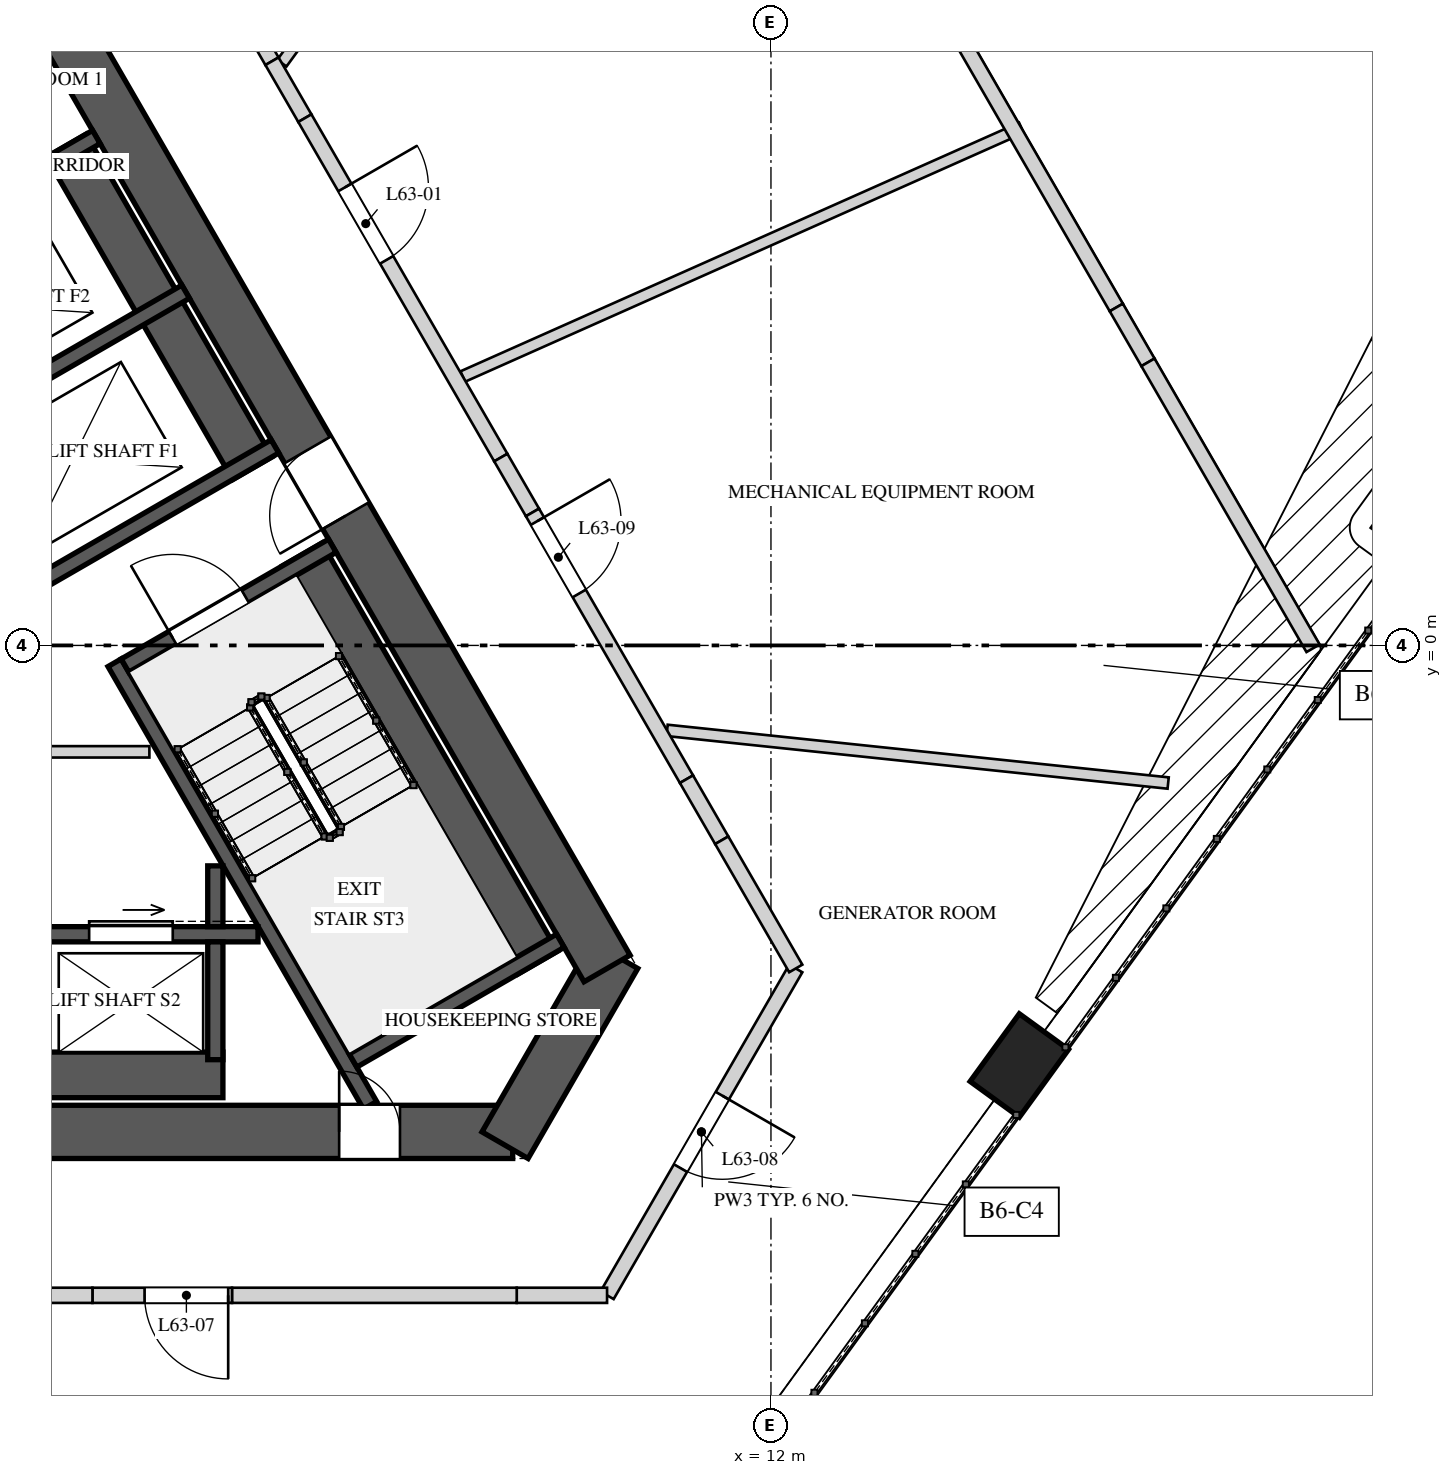
"""IFC4 building model, lengths in metres.
Left out: names, types, materials, properties, quantities, classifications, styles, units other than length and angle.
Written with IfcOpenShell. Run it as: python <this file> out.ifc"""

import sys

from ifc_helpers import new_model, si_unit, direction, frame, frame_2d, origin, origin_2d, place, context, subcontext, project, spatial, polyline, rectangle, outline, extrude, element, fill, save


model = new_model("IFC4")
c1 = context("Model", 3, precision=1e-05, world=origin(), true_north=direction((0.0, 1.0)))
c2 = subcontext(c1, "Body", "Model", "MODEL_VIEW")
j1 = project(units=[si_unit("LENGTHUNIT", "METRE"), si_unit("PLANEANGLEUNIT", "RADIAN")], contexts=[c1])
p1 = place(None, origin())
s1 = spatial("IfcSite", under=j1, at=p1, CompositionType="ELEMENT")
p2 = place(p1, origin())
s2 = spatial("IfcBuilding", under=s1, at=p2, CompositionType="ELEMENT")
p3 = place(p2, frame((0.0, 0.0, 269.2)))
s3 = spatial("IfcBuildingStorey", under=s2, at=p3, CompositionType="ELEMENT", Elevation=269.2)
p4 = place(p3, frame((-8.603, -6.4, 0.0), z_axis=(0.0, 0.0, 1.0), x_axis=(1.0, 0.0, 0.0)))
e1 = element("IfcWall", 1, at=p4, inside=s3, PredefinedType="SHEAR", context=c2, shape_type="SweptSolid", body=[
    extrude(rectangle(XDim=17.205, YDim=0.7, at=frame_2d((8.603, 0.0))), origin(), (0.0, 0.0, 1.0), 5.2),
])
p5 = place(p4, frame((6.808, 0.0, 0.0)))
e2 = element("IfcOpeningElement", 2, at=p5, cuts=e1, PredefinedType="OPENING", context=c2, shape_type="SweptSolid", body=[
    extrude(rectangle(XDim=1.0, YDim=2.4, at=frame_2d((0.5, 1.2))), frame((0.0, 0.36, 0.0), z_axis=(0.0, -1.0, 0.0), x_axis=(1.0, 0.0, 0.0)), (0.0, 0.0, 1.0), 0.72),
])
p6 = place(p4, frame((14.922, 0.0, 0.0)))
e3 = element("IfcOpeningElement", 3, at=p6, cuts=e1, PredefinedType="OPENING", context=c2, shape_type="SweptSolid", body=[
    extrude(rectangle(XDim=0.8, YDim=2.1, at=frame_2d((0.4, 1.05))), frame((0.0, 0.36, 0.0), z_axis=(0.0, -1.0, 0.0), x_axis=(1.0, 0.0, 0.0)), (0.0, 0.0, 1.0), 0.72),
])
p7 = place(p3, frame((8.501, -6.575, 0.0), z_axis=(0.0, 0.0, 1.0), x_axis=(0.499995765644, 0.866027848477, 0.0)))
e4 = element("IfcWall", 4, at=p7, inside=s3, PredefinedType="SHEAR", context=c2, shape_type="SweptSolid", body=[
    extrude(rectangle(XDim=2.887, YDim=0.7, at=frame_2d((1.443, 0.0))), origin(), (0.0, 0.0, 1.0), 5.2),
])
p8 = place(p3, frame((9.844, -4.25, 0.0), z_axis=(0.0, 0.0, 1.0), x_axis=(-0.500003331888, 0.866023480109, 0.0)))
e5 = element("IfcWall", 5, at=p8, inside=s3, PredefinedType="SHEAR", context=c2, shape_type="SweptSolid", body=[
    extrude(rectangle(XDim=17.205, YDim=0.7, at=frame_2d((8.603, 0.0))), origin(), (0.0, 0.0, 1.0), 5.2),
])
p9 = place(p8, frame((6.877, 0.0, 0.0)))
e6 = element("IfcOpeningElement", 6, at=p9, cuts=e5, PredefinedType="OPENING", context=c2, shape_type="SweptSolid", body=[
    extrude(rectangle(XDim=1.0, YDim=2.4, at=frame_2d((0.5, 1.2))), frame((0.0, 0.36, 0.0), z_axis=(0.0, -1.0, 0.0), x_axis=(1.0, 0.0, 0.0)), (0.0, 0.0, 1.0), 0.72),
])
p10 = place(p8, frame((14.445, 0.0, 0.0)))
e7 = element("IfcOpeningElement", 7, at=p10, cuts=e5, PredefinedType="OPENING", context=c2, shape_type="SweptSolid", body=[
    extrude(rectangle(XDim=0.8, YDim=2.1, at=frame_2d((0.4, 1.05))), frame((0.0, 0.36, 0.0), z_axis=(0.0, -1.0, 0.0), x_axis=(1.0, 0.0, 0.0)), (0.0, 0.0, 1.0), 0.72),
])
for number, where, z_axis, x_axis in (
    (8, (15.268, -5.526, 0.0), (0.0, 0.0, 1.0), (0.588, 0.809, 0.0)),
    (9, (20.562, 1.76, 0.0), (0.0, 0.0, 1.0), (0.588, 0.809, 0.0)),
):
    element("IfcColumn", number, at=place(p3, frame(where, z_axis=z_axis, x_axis=x_axis)), inside=s3, PredefinedType="COLUMN", context=c2, shape_type="SweptSolid", body=[
        extrude(rectangle(XDim=1.1, YDim=0.8, at=origin_2d()), origin(), (0.0, 0.0, 1.0), 2.787),
    ])
p11 = place(p3, frame((8.933, -4.172, 0.0), z_axis=(0.0, 0.0, 1.0), x_axis=(-0.500026960575, 0.86600983753, 0.0)))
e10 = element("IfcWall", 10, at=p11, inside=s3, PredefinedType="SOLIDWALL", context=c2, shape_type="SweptSolid", body=[
    extrude(rectangle(XDim=6.2, YDim=0.6, at=frame_2d((3.1, 0.0))), origin(), (0.0, 0.0, 1.0), 4.85),
])
p12 = place(p3, frame((6.726, -6.05, 0.0), z_axis=(0.0, 0.0, 1.0), x_axis=(-0.499970804718, 0.866042259032, 0.0)))
e11 = element("IfcWall", 11, at=p12, inside=s3, PredefinedType="SOLIDWALL", context=c2, shape_type="SweptSolid", body=[
    extrude(rectangle(XDim=6.723, YDim=0.2, at=frame_2d((3.361, 0.0))), origin(), (0.0, 0.0, 1.0), 4.85),
])
p13 = place(p3, frame((6.501, -5.461, 0.0), z_axis=(0.0, 0.0, 1.0), x_axis=(0.866035871367, 0.499981869177, 0.0)))
e12 = element("IfcWall", 12, at=p13, inside=s3, PredefinedType="SOLIDWALL", context=c2, shape_type="SweptSolid", body=[
    extrude(rectangle(XDim=3.15, YDim=0.2, at=frame_2d((1.575, 0.0))), origin(), (0.0, 0.0, 1.0), 4.85),
])
p14 = place(p3, frame((3.501, -0.265, 0.0), z_axis=(0.0, 0.0, 1.0), x_axis=(0.866035871367, 0.499981869177, 0.0)))
e13 = element("IfcWall", 13, at=p14, inside=s3, PredefinedType="SOLIDWALL", context=c2, shape_type="SweptSolid", body=[
    extrude(rectangle(XDim=3.15, YDim=0.2, at=frame_2d((1.575, 0.0))), origin(), (0.0, 0.0, 1.0), 4.85),
])
p15 = place(p14, frame((0.725, 0.0, 0.0)))
e14 = element("IfcOpeningElement", 14, at=p15, cuts=e13, PredefinedType="OPENING", context=c2, shape_type="SweptSolid", body=[
    extrude(rectangle(XDim=1.1, YDim=2.4, at=frame_2d((0.55, 1.2))), frame((0.0, 0.11, 0.0), z_axis=(0.0, -1.0, 0.0), x_axis=(1.0, 0.0, 0.0)), (0.0, 0.0, 1.0), 0.22),
])
p16 = place(p3, frame((-0.71, -3.8, 0.0), z_axis=(0.0, 0.0, 1.0), x_axis=(1.0, 0.0, 0.0)))
e15 = element("IfcWall", 15, at=p16, inside=s3, PredefinedType="SOLIDWALL", context=c2, shape_type="SweptSolid", body=[
    extrude(rectangle(XDim=5.961, YDim=0.2, at=frame_2d((2.981, 0.0))), origin(), (0.0, 0.0, 1.0), 4.85),
])
p17 = place(p16, frame((1.09, 0.0, 0.0)))
e16 = element("IfcOpeningElement", 16, at=p17, cuts=e15, PredefinedType="OPENING", context=c2, shape_type="SweptSolid", body=[
    extrude(rectangle(XDim=1.1, YDim=2.1, at=frame_2d((0.55, 1.05))), frame((0.0, 0.11, 0.0), z_axis=(0.0, -1.0, 0.0), x_axis=(1.0, 0.0, 0.0)), (0.0, 0.0, 1.0), 0.22),
])
p18 = place(p16, frame((3.74, 0.0, 0.0)))
e17 = element("IfcOpeningElement", 17, at=p18, cuts=e15, PredefinedType="OPENING", context=c2, shape_type="SweptSolid", body=[
    extrude(rectangle(XDim=1.1, YDim=2.1, at=frame_2d((0.55, 1.05))), frame((0.0, 0.11, 0.0), z_axis=(0.0, -1.0, 0.0), x_axis=(1.0, 0.0, 0.0)), (0.0, 0.0, 1.0), 0.22),
])
p19 = place(p3, frame((-0.71, -5.65, 0.0), z_axis=(0.0, 0.0, 1.0), x_axis=(1.0, 0.0, 0.0)))
e18 = element("IfcWall", 18, at=p19, inside=s3, PredefinedType="SOLIDWALL", context=c2, shape_type="SweptSolid", body=[
    extrude(rectangle(XDim=5.5, YDim=0.6, at=frame_2d((2.75, 0.0))), origin(), (0.0, 0.0, 1.0), 4.85),
])
p20 = place(p3, frame((4.69, -3.9, 0.0), z_axis=(0.0, 0.0, 1.0), x_axis=(0.0, -1.0, 0.0)))
e19 = element("IfcWall", 19, at=p20, inside=s3, PredefinedType="SOLIDWALL", context=c2, shape_type="SweptSolid", body=[
    extrude(rectangle(XDim=1.55, YDim=0.2, at=frame_2d((0.775, 0.0))), origin(), (0.0, 0.0, 1.0), 4.85),
])
p21 = place(p3, frame((4.69, -2.9, 0.0), z_axis=(0.0, 0.0, 1.0), x_axis=(0.0, -1.0, 0.0)))
e20 = element("IfcWall", 20, at=p21, inside=s3, PredefinedType="SOLIDWALL", context=c2, shape_type="SweptSolid", body=[
    extrude(rectangle(XDim=0.8, YDim=0.2, at=frame_2d((0.4, 0.0))), origin(), (0.0, 0.0, 1.0), 4.85),
])
p22 = place(p3, frame((5.178, 2.331, 0.0), z_axis=(0.0, 0.0, 1.0), x_axis=(-0.49998122708, 0.866036242063, 0.0)))
e21 = element("IfcWall", 21, at=p22, inside=s3, PredefinedType="SOLIDWALL", context=c2, shape_type="SweptSolid", body=[
    extrude(rectangle(XDim=4.9, YDim=0.6, at=frame_2d((2.45, 0.0))), origin(), (0.0, 0.0, 1.0), 4.85),
])
p23 = place(p3, frame((2.227, 0.743, 0.0), z_axis=(0.0, 0.0, 1.0), x_axis=(0.866022959057, 0.500004234368, 0.0)))
e22 = element("IfcWall", 22, at=p23, inside=s3, PredefinedType="SOLIDWALL", context=c2, shape_type="SweptSolid", body=[
    extrude(rectangle(XDim=3.75, YDim=0.2, at=frame_2d((1.875, 0.0))), origin(), (0.0, 0.0, 1.0), 4.85),
])
p24 = place(p3, frame((1.052, 2.778, 0.0), z_axis=(0.0, 0.0, 1.0), x_axis=(0.866039234136, 0.499976044363, 0.0)))
e23 = element("IfcWall", 23, at=p24, inside=s3, PredefinedType="SOLIDWALL", context=c2, shape_type="SweptSolid", body=[
    extrude(rectangle(XDim=3.75, YDim=0.2, at=frame_2d((1.875, 0.0))), origin(), (0.0, 0.0, 1.0), 4.85),
])
p25 = place(p3, frame((-0.123, 4.813, 0.0), z_axis=(0.0, 0.0, 1.0), x_axis=(0.866022959057, 0.500004234368, 0.0)))
e24 = element("IfcWall", 24, at=p25, inside=s3, PredefinedType="SOLIDWALL", context=c2, shape_type="SweptSolid", body=[
    extrude(rectangle(XDim=3.75, YDim=0.2, at=frame_2d((1.875, 0.0))), origin(), (0.0, 0.0, 1.0), 4.85),
])
p26 = place(p3, frame((-4.053, -1.4, 0.0), z_axis=(0.0, 0.0, 1.0), x_axis=(1.0, 0.0, 0.0)))
e25 = element("IfcWall", 25, at=p26, inside=s3, PredefinedType="PARTITIONING", context=c2, shape_type="SweptSolid", body=[
    extrude(rectangle(XDim=7.876, YDim=0.15, at=frame_2d((3.938, 0.0))), origin(), (0.0, 0.0, 1.0), 4.85),
])
p27 = place(p3, frame((5.565, 7.66, 0.0), z_axis=(0.0, 0.0, 1.0), x_axis=(0.587787750024, 0.809015179661, 0.0)))
e26 = element("IfcWall", 26, at=p27, inside=s3, PredefinedType="PARTITIONING", context=c2, shape_type="SweptSolid", body=[
    extrude(rectangle(XDim=3.555, YDim=0.15, at=frame_2d((1.777, 0.0))), origin(), (0.0, 0.0, 1.0), 3.95),
])
p28 = place(p3, frame((10.634, -1.118, 0.0), z_axis=(0.0, 0.0, 1.0), x_axis=(0.994521586964, -0.104531397497, 0.0)))
e27 = element("IfcWall", 27, at=p28, inside=s3, PredefinedType="PARTITIONING", context=c2, shape_type="SweptSolid", body=[
    extrude(rectangle(XDim=6.628, YDim=0.15, at=frame_2d((3.314, 0.0))), origin(), (0.0, 0.0, 1.0), 4.85),
])
p29 = place(p3, frame((15.294, 6.81, 0.0), z_axis=(0.0, 0.0, 1.0), x_axis=(-0.91353850426, -0.406752260269, 0.0)))
e28 = element("IfcWall", 28, at=p29, inside=s3, PredefinedType="PARTITIONING", context=c2, shape_type="SweptSolid", body=[
    extrude(rectangle(XDim=8.044, YDim=0.15, at=frame_2d((4.022, 0.0))), origin(), (0.0, 0.0, 1.0), 4.85),
])
p30 = place(p3, frame((12.326, -4.25, 0.0), z_axis=(0.0, 0.0, 1.0), x_axis=(-0.50000478328, -0.866022642139, 0.0)))
e29 = element("IfcWall", 29, at=p30, inside=s3, PredefinedType="SOLIDWALL", context=c2, shape_type="SweptSolid", body=[
    extrude(rectangle(XDim=4.965, YDim=0.2, at=frame_2d((2.483, 0.0))), origin(), (0.0, 0.0, 1.0), 4.85),
])
p31 = place(p30, frame((1.933, 0.0, 0.0)))
e30 = element("IfcOpeningElement", 30, at=p31, cuts=e29, PredefinedType="OPENING", context=c2, shape_type="SweptSolid", body=[
    extrude(rectangle(XDim=1.1, YDim=2.2, at=frame_2d((0.55, 1.1))), frame((0.0, 0.11, 0.0), z_axis=(0.0, -1.0, 0.0), x_axis=(1.0, 0.0, 0.0)), (0.0, 0.0, 1.0), 0.22),
])
p32 = place(p3, frame((9.844, -8.55, 0.0), z_axis=(0.0, 0.0, 1.0), x_axis=(-1.0, 0.0, 0.0)))
e31 = element("IfcWall", 31, at=p32, inside=s3, PredefinedType="SOLIDWALL", context=c2, shape_type="SweptSolid", body=[
    extrude(rectangle(XDim=1.188, YDim=0.2, at=frame_2d((0.594, 0.0))), origin(), (0.0, 0.0, 1.0), 4.15),
])
p33 = place(p3, frame((8.655, -8.55, 0.0), z_axis=(0.0, 0.0, 1.0), x_axis=(-1.0, 0.0, 0.0)))
e32 = element("IfcWall", 32, at=p33, inside=s3, PredefinedType="SOLIDWALL", context=c2, shape_type="SweptSolid", body=[
    extrude(rectangle(XDim=3.746, YDim=0.2, at=frame_2d((1.873, 0.0))), origin(), (0.0, 0.0, 1.0), 4.85),
])
p34 = place(p3, frame((4.909, -8.55, 0.0), z_axis=(0.0, 0.0, 1.0), x_axis=(-1.0, 0.0, 0.0)))
e33 = element("IfcWall", 33, at=p34, inside=s3, PredefinedType="SOLIDWALL", context=c2, shape_type="SweptSolid", body=[
    extrude(outline(polyline([(0.0, 0.0), (1.836, 0.0), (1.836, 3.95), (0.971, 3.95), (0.971, 4.85), (0.0, 4.85), (0.0, 0.0)])), frame((0.0, 0.1, 0.0), z_axis=(0.0, -1.0, 0.0), x_axis=(1.0, 0.0, 0.0)), (0.0, 0.0, 1.0), 0.2),
])
p35 = place(p34, frame((0.05, 0.0, 0.0)))
e34 = element("IfcOpeningElement", 34, at=p35, cuts=e33, PredefinedType="OPENING", context=c2, shape_type="SweptSolid", body=[
    extrude(rectangle(XDim=1.1, YDim=2.2, at=frame_2d((0.55, 1.1))), frame((0.0, 0.11, 0.0), z_axis=(0.0, -1.0, 0.0), x_axis=(1.0, 0.0, 0.0)), (0.0, 0.0, 1.0), 0.22),
])
p36 = place(p3, frame((3.073, -8.55, 0.0), z_axis=(0.0, 0.0, 1.0), x_axis=(-1.0, 0.0, 0.0)))
e35 = element("IfcWall", 35, at=p36, inside=s3, PredefinedType="SOLIDWALL", context=c2, shape_type="SweptSolid", body=[
    extrude(rectangle(XDim=5.156, YDim=0.2, at=frame_2d((2.578, 0.0))), origin(), (0.0, 0.0, 1.0), 4.85),
])
p37 = place(p3, frame((3.077, 11.771, 0.0), z_axis=(0.0, 0.0, 1.0), x_axis=(0.500007683529, -0.866020967652, 0.0)))
e36 = element("IfcWall", 36, at=p37, inside=s3, PredefinedType="SOLIDWALL", context=c2, shape_type="SweptSolid", body=[
    extrude(rectangle(XDim=4.717, YDim=0.2, at=frame_2d((2.359, 0.0))), origin(), (0.0, 0.0, 1.0), 4.85),
])
p38 = place(p37, frame((1.339, 0.0, 0.0)))
e37 = element("IfcOpeningElement", 37, at=p38, cuts=e36, PredefinedType="OPENING", context=c2, shape_type="SweptSolid", body=[
    extrude(rectangle(XDim=1.1, YDim=2.2, at=frame_2d((0.55, 1.1))), frame((0.0, 0.11, 0.0), z_axis=(0.0, -1.0, 0.0), x_axis=(1.0, 0.0, 0.0)), (0.0, 0.0, 1.0), 0.22),
])
p39 = place(p3, frame((5.436, 7.686, 0.0), z_axis=(0.0, 0.0, 1.0), x_axis=(0.500056482814, -0.86599279096, 0.0)))
e38 = element("IfcWall", 38, at=p39, inside=s3, PredefinedType="SOLIDWALL", context=c2, shape_type="SweptSolid", body=[
    extrude(rectangle(XDim=0.865, YDim=0.2, at=frame_2d((0.432, 0.0))), origin(), (0.0, 0.0, 1.0), 3.95),
])
p40 = place(p3, frame((5.868, 6.937, 0.0), z_axis=(0.0, 0.0, 1.0), x_axis=(0.499973847261, -0.866040502549, 0.0)))
e39 = element("IfcWall", 39, at=p40, inside=s3, PredefinedType="SOLIDWALL", context=c2, shape_type="SweptSolid", body=[
    extrude(rectangle(XDim=5.156, YDim=0.2, at=frame_2d((2.578, 0.0))), origin(), (0.0, 0.0, 1.0), 4.85),
])
p41 = place(p40, frame((1.052, 0.0, 0.0)))
e40 = element("IfcOpeningElement", 40, at=p41, cuts=e39, PredefinedType="OPENING", context=c2, shape_type="SweptSolid", body=[
    extrude(rectangle(XDim=1.1, YDim=2.2, at=frame_2d((0.55, 1.1))), frame((0.0, 0.11, 0.0), z_axis=(0.0, -1.0, 0.0), x_axis=(1.0, 0.0, 0.0)), (0.0, 0.0, 1.0), 0.22),
])
p42 = place(p3, frame((8.446, 2.471, 0.0), z_axis=(0.0, 0.0, 1.0), x_axis=(0.499950631041, -0.86605390509, 0.0)))
e41 = element("IfcWall", 41, at=p42, inside=s3, PredefinedType="SOLIDWALL", context=c2, shape_type="SweptSolid", body=[
    extrude(rectangle(XDim=0.833, YDim=0.2, at=frame_2d((0.417, 0.0))), origin(), (0.0, 0.0, 1.0), 3.95),
])
p43 = place(p3, frame((8.863, 1.75, 0.0), z_axis=(0.0, 0.0, 1.0), x_axis=(0.500007556608, -0.866021040931, 0.0)))
e42 = element("IfcWall", 42, at=p43, inside=s3, PredefinedType="SOLIDWALL", context=c2, shape_type="SweptSolid", body=[
    extrude(rectangle(XDim=4.052, YDim=0.2, at=frame_2d((2.026, 0.0))), origin(), (0.0, 0.0, 1.0), 4.85),
])
p44 = place(p43, frame((0.131, 0.0, 0.0)))
e43 = element("IfcOpeningElement", 43, at=p44, cuts=e42, PredefinedType="OPENING", context=c2, shape_type="SweptSolid", body=[
    extrude(rectangle(XDim=1.1, YDim=2.2, at=frame_2d((0.55, 1.1))), frame((0.0, 0.11, 0.0), z_axis=(0.0, -1.0, 0.0), x_axis=(1.0, 0.0, 0.0)), (0.0, 0.0, 1.0), 0.22),
])
p45 = place(p3, frame((10.889, -1.76, 0.0), z_axis=(0.0, 0.0, 1.0), x_axis=(0.500102178127, -0.865966403178, 0.0)))
e44 = element("IfcWall", 44, at=p45, inside=s3, PredefinedType="SOLIDWALL", context=c2, shape_type="SweptSolid", body=[
    extrude(rectangle(XDim=0.927, YDim=0.2, at=frame_2d((0.464, 0.0))), origin(), (0.0, 0.0, 1.0), 4.15),
])
p46 = place(p3, frame((11.353, -2.563, 0.0), z_axis=(0.0, 0.0, 1.0), x_axis=(0.499953905513, -0.866052014814, 0.0)))
e45 = element("IfcWall", 45, at=p46, inside=s3, PredefinedType="SOLIDWALL", context=c2, shape_type="SweptSolid", body=[
    extrude(rectangle(XDim=1.948, YDim=0.2, at=frame_2d((0.974, 0.0))), origin(), (0.0, 0.0, 1.0), 4.85),
])
p47 = place(p3, frame((11.156, 13.777, 0.0), z_axis=(0.0, 0.0, 1.0), x_axis=(0.499984626538, -0.866034279475, 0.0)))
e46 = element("IfcWall", 46, at=p47, inside=s3, PredefinedType="SOLIDWALL", context=c2, shape_type="SweptSolid", body=[
    extrude(rectangle(XDim=10.775, YDim=0.2, at=frame_2d((5.387, 0.0))), origin(), (0.0, 0.0, 1.0), 4.85),
])
p48 = place(p3, frame((16.543, 4.446, 0.0), z_axis=(0.0, 0.0, 1.0), x_axis=(0.500077471398, -0.865980671032, 0.0)))
e47 = element("IfcWall", 47, at=p48, inside=s3, PredefinedType="SOLIDWALL", context=c2, shape_type="SweptSolid", body=[
    extrude(rectangle(XDim=0.833, YDim=0.2, at=frame_2d((0.417, 0.0))), origin(), (0.0, 0.0, 1.0), 3.95),
])
p49 = place(p3, frame((16.96, 3.724, 0.0), z_axis=(0.0, 0.0, 1.0), x_axis=(0.500007885066, -0.866020851292, 0.0)))
e48 = element("IfcWall", 48, at=p49, inside=s3, PredefinedType="SOLIDWALL", context=c2, shape_type="SweptSolid", body=[
    extrude(rectangle(XDim=4.344, YDim=0.2, at=frame_2d((2.172, 0.0))), origin(), (0.0, 0.0, 1.0), 4.85),
])
p50 = place(p15, origin())
e49 = element("IfcDoor", 49, at=p50, inside=s3, OperationType="SINGLE_SWING_RIGHT", PredefinedType="DOOR", context=c2, shape_type="SweptSolid", body=[
    extrude(rectangle(XDim=1.1, YDim=2.4, at=frame_2d((0.55, 1.2))), frame((0.0, 0.025, 0.0), z_axis=(0.0, -1.0, 0.0), x_axis=(1.0, 0.0, 0.0)), (0.0, 0.0, 1.0), 0.05),
])
fill(e14, e49)
p51 = place(p18, origin())
e50 = element("IfcDoor", 50, at=p51, inside=s3, OperationType="SLIDING_TO_RIGHT", PredefinedType="DOOR", context=c2, shape_type="SweptSolid", body=[
    extrude(rectangle(XDim=1.1, YDim=2.1, at=frame_2d((0.55, 1.05))), frame((0.0, 0.025, 0.0), z_axis=(0.0, -1.0, 0.0), x_axis=(1.0, 0.0, 0.0)), (0.0, 0.0, 1.0), 0.05),
])
fill(e17, e50)
p52 = place(p9, origin())
e51 = element("IfcDoor", 51, at=p52, inside=s3, OperationType="SINGLE_SWING_RIGHT", PredefinedType="DOOR", context=c2, shape_type="SweptSolid", body=[
    extrude(rectangle(XDim=1.0, YDim=2.4, at=frame_2d((0.5, 1.2))), frame((0.0, 0.025, 0.0), z_axis=(0.0, -1.0, 0.0), x_axis=(1.0, 0.0, 0.0)), (0.0, 0.0, 1.0), 0.05),
])
fill(e6, e51)
p53 = place(p6, origin())
e52 = element("IfcDoor", 52, at=p53, inside=s3, OperationType="SINGLE_SWING_LEFT", PredefinedType="DOOR", context=c2, shape_type="SweptSolid", body=[
    extrude(rectangle(XDim=0.8, YDim=2.1, at=frame_2d((0.4, 1.05))), frame((0.0, 0.025, 0.0), z_axis=(0.0, -1.0, 0.0), x_axis=(1.0, 0.0, 0.0)), (0.0, 0.0, 1.0), 0.05),
])
fill(e3, e52)
p54 = place(p41, origin())
e53 = element("IfcDoor", 53, at=p54, inside=s3, OperationType="SINGLE_SWING_LEFT", PredefinedType="DOOR", context=c2, shape_type="SweptSolid", body=[
    extrude(rectangle(XDim=1.1, YDim=2.2, at=frame_2d((0.55, 1.1))), frame((0.0, 0.025, 0.0), z_axis=(0.0, -1.0, 0.0), x_axis=(1.0, 0.0, 0.0)), (0.0, 0.0, 1.0), 0.05),
])
fill(e40, e53)
p55 = place(p35, origin())
e54 = element("IfcDoor", 54, at=p55, inside=s3, OperationType="SINGLE_SWING_LEFT", PredefinedType="DOOR", context=c2, shape_type="SweptSolid", body=[
    extrude(rectangle(XDim=1.1, YDim=2.2, at=frame_2d((0.55, 1.1))), frame((0.0, 0.025, 0.0), z_axis=(0.0, -1.0, 0.0), x_axis=(1.0, 0.0, 0.0)), (0.0, 0.0, 1.0), 0.05),
])
fill(e34, e54)
p56 = place(p31, origin())
e55 = element("IfcDoor", 55, at=p56, inside=s3, OperationType="SINGLE_SWING_RIGHT", PredefinedType="DOOR", context=c2, shape_type="SweptSolid", body=[
    extrude(rectangle(XDim=1.1, YDim=2.2, at=frame_2d((0.55, 1.1))), frame((0.0, 0.025, 0.0), z_axis=(0.0, -1.0, 0.0), x_axis=(1.0, 0.0, 0.0)), (0.0, 0.0, 1.0), 0.05),
])
fill(e30, e55)
p57 = place(p44, origin())
e56 = element("IfcDoor", 56, at=p57, inside=s3, OperationType="SINGLE_SWING_LEFT", PredefinedType="DOOR", context=c2, shape_type="SweptSolid", body=[
    extrude(rectangle(XDim=1.1, YDim=2.2, at=frame_2d((0.55, 1.1))), frame((0.0, 0.025, 0.0), z_axis=(0.0, -1.0, 0.0), x_axis=(1.0, 0.0, 0.0)), (0.0, 0.0, 1.0), 0.05),
])
fill(e43, e56)
save(model, sys.argv[1])
